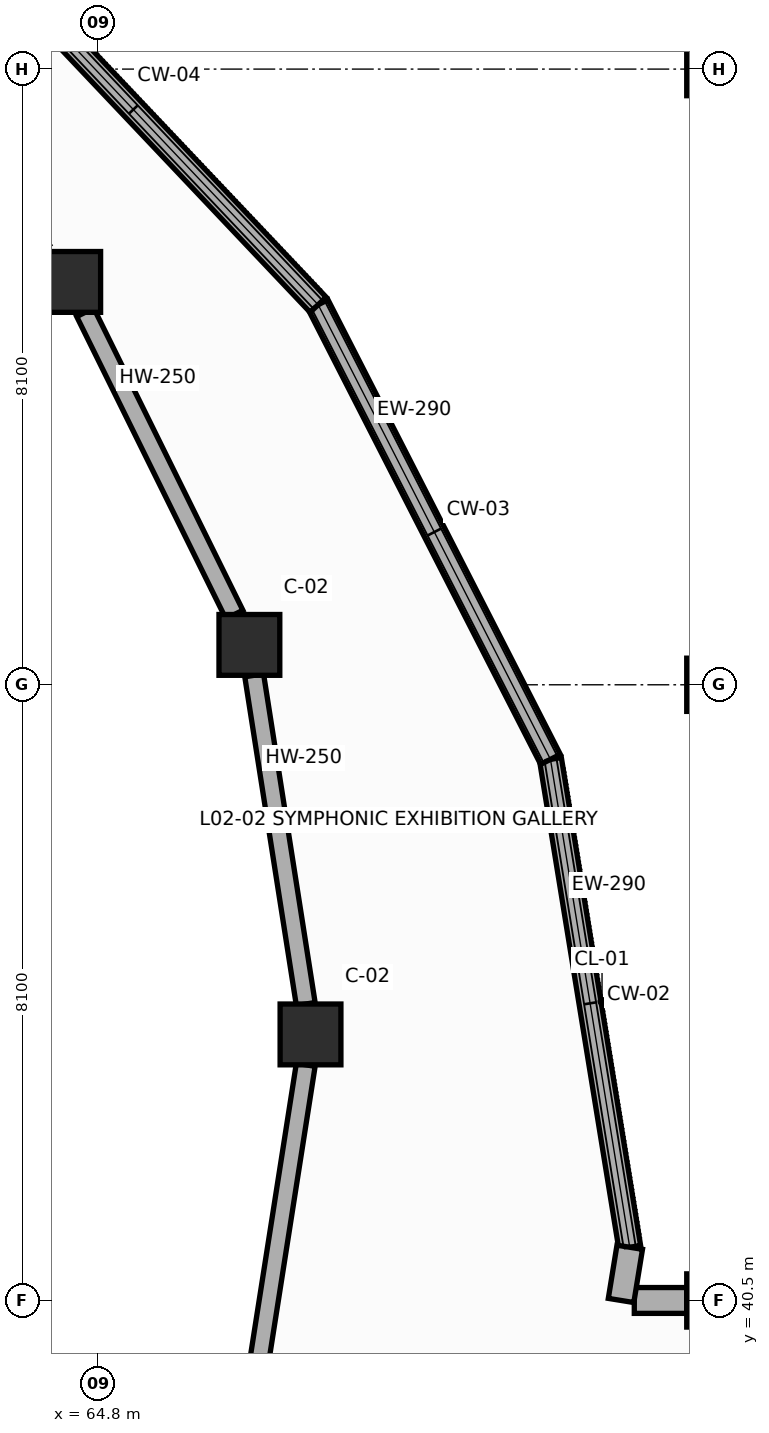
"""IFC4 building model, lengths in metres.
Left out: names, types, materials, properties, quantities, classifications, styles, units other than length and angle.
Written with IfcOpenShell. Run it as: python <this file> out.ifc"""

import sys

from ifc_helpers import new_model, si_unit, direction, frame, frame_2d, origin, origin_2d, place, context, subcontext, project, spatial, rectangle, extrude, element, save


model = new_model("IFC4")
c1 = context("Model", 3, precision=1e-05, world=origin(), true_north=direction((0.0, 1.0)))
c2 = subcontext(c1, "Body", "Model", "MODEL_VIEW")
j1 = project(units=[si_unit("LENGTHUNIT", "METRE"), si_unit("PLANEANGLEUNIT", "RADIAN")], contexts=[c1])
p1 = place(None, origin())
s1 = spatial("IfcSite", under=j1, at=p1, CompositionType="ELEMENT")
p2 = place(p1, origin())
s2 = spatial("IfcBuilding", under=s1, at=p2, CompositionType="ELEMENT")
p3 = place(p2, frame((0.0, 0.0, 10.2)))
s3 = spatial("IfcBuildingStorey", under=s2, at=p3, CompositionType="ELEMENT", Elevation=10.2)
for number, where, z_axis, x_axis in (
    (1, (67.6, 44.0, 0.0), (0.0, 0.0, 1.0), (1.0, 0.0, 0.0)),
    (2, (66.796, 49.125, 0.0), (0.0, 0.0, 1.0), (1.0, 0.0, 0.0)),
    (3, (64.438, 53.9, 0.0), (0.0, 0.0, 1.0), (1.0, 0.0, 0.0)),
):
    element("IfcColumn", number, at=place(p3, frame(where, z_axis=z_axis, x_axis=x_axis)), inside=s3, PredefinedType="COLUMN", context=c2, shape_type="SweptSolid", body=[
        extrude(rectangle(XDim=0.8, YDim=0.8, at=origin_2d()), origin(), (0.0, 0.0, 1.0), 4.8),
    ])
for number, where, z_axis, x_axis in (
    (4, (72.9, 40.5, 0.0), (0.0, 0.0, 1.0), (1.0, 0.0, 0.0)),
    (5, (72.9, 48.6, 0.0), (0.0, 0.0, 1.0), (1.0, 0.0, 0.0)),
    (6, (72.9, 56.7, 0.0), (0.0, 0.0, 1.0), (1.0, 0.0, 0.0)),
):
    element("IfcColumn", number, at=place(p3, frame(where, z_axis=z_axis, x_axis=x_axis)), inside=s3, PredefinedType="COLUMN", context=c2, shape_type="SweptSolid", body=[
        extrude(rectangle(XDim=0.7, YDim=0.7, at=origin_2d()), origin(), (0.0, 0.0, 1.0), 4.8),
    ])
p4 = place(p3, frame((70.757, 47.619, 0.0), z_axis=(0.0, 0.0, 1.0), x_axis=(0.160348975304, -0.987060386258, 0.0)))
e7 = element("IfcWall", 7, at=p4, inside=s3, PredefinedType="SOLIDWALL", context=c2, shape_type="SweptSolid", body=[
    extrude(rectangle(XDim=6.503, YDim=0.29, at=frame_2d((3.251, 0.0))), origin(), (0.0, 0.0, 1.0), 1.15),
])
p5 = place(p3, frame((67.7, 53.6, 0.0), z_axis=(0.0, 0.0, 1.0), x_axis=(0.455075838645, -0.890452683236, 0.0)))
e8 = element("IfcWall", 8, at=p5, inside=s3, PredefinedType="SOLIDWALL", context=c2, shape_type="SweptSolid", body=[
    extrude(rectangle(XDim=6.717, YDim=0.29, at=frame_2d((3.359, 0.0))), origin(), (0.0, 0.0, 1.0), 1.15),
])
p6 = place(p3, frame((62.837, 58.736, 0.0), z_axis=(0.0, 0.0, 1.0), x_axis=(0.687548353371, -0.72613859681, 0.0)))
e9 = element("IfcWall", 9, at=p6, inside=s3, PredefinedType="SOLIDWALL", context=c2, shape_type="SweptSolid", body=[
    extrude(rectangle(XDim=7.073, YDim=0.29, at=frame_2d((3.537, 0.0))), origin(), (0.0, 0.0, 1.0), 1.15),
])
p7 = place(p3, frame((72.55, 40.5, 0.0), z_axis=(0.0, 0.0, 1.0), x_axis=(-1.0, 0.0, 0.0)))
e10 = element("IfcWall", 10, at=p7, inside=s3, PredefinedType="SOLIDWALL", context=c2, shape_type="SweptSolid", body=[
    extrude(rectangle(XDim=0.69, YDim=0.34, at=frame_2d((0.345, 0.0))), origin(), (0.0, 0.0, 1.0), 4.5),
])
p8 = place(p3, frame((71.686, 40.5, 0.0), z_axis=(0.0, 0.0, 1.0), x_axis=(0.160769193514, 0.986992029561, 0.0)))
e11 = element("IfcWall", 11, at=p8, inside=s3, PredefinedType="SOLIDWALL", context=c2, shape_type="SweptSolid", body=[
    extrude(rectangle(XDim=0.709, YDim=0.34, at=frame_2d((0.354, 0.0))), origin(), (0.0, 0.0, 1.0), 4.5),
])
p9 = place(p3, frame((66.859, 48.725, 0.0), z_axis=(0.0, 0.0, 1.0), x_axis=(0.154985912507, -0.987916680153, 0.0)))
e12 = element("IfcWall", 12, at=p9, inside=s3, PredefinedType="SOLIDWALL", context=c2, shape_type="SweptSolid", body=[
    extrude(rectangle(XDim=4.378, YDim=0.25, at=frame_2d((2.189, 0.0))), origin(), (0.0, 0.0, 1.0), 3.724),
])
p10 = place(p3, frame((64.636, 53.5, 0.0), z_axis=(0.0, 0.0, 1.0), x_axis=(0.442692313403, -0.896673583671, 0.0)))
e13 = element("IfcWall", 13, at=p10, inside=s3, PredefinedType="SOLIDWALL", context=c2, shape_type="SweptSolid", body=[
    extrude(rectangle(XDim=4.433, YDim=0.25, at=frame_2d((2.217, 0.0))), origin(), (0.0, 0.0, 1.0), 3.724),
])
p11 = place(p3, frame((67.537, 43.6, 0.0), z_axis=(0.0, 0.0, 1.0), x_axis=(-0.154985912507, -0.987916680153, 0.0)))
e14 = element("IfcWall", 14, at=p11, inside=s3, PredefinedType="SOLIDWALL", context=c2, shape_type="SweptSolid", body=[
    extrude(rectangle(XDim=4.378, YDim=0.25, at=frame_2d((2.189, 0.0))), origin(), (0.0, 0.0, 1.0), 3.724),
])
save(model, sys.argv[1])
